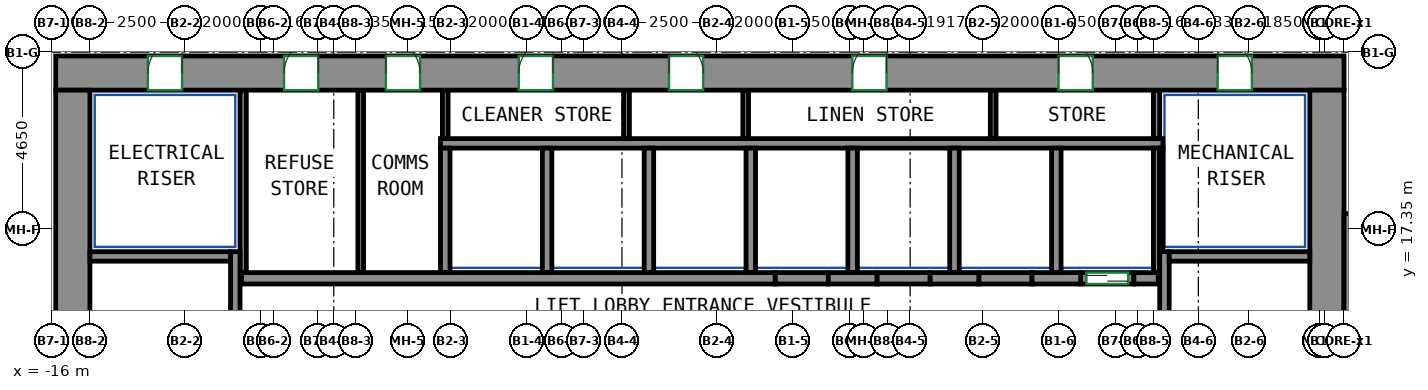
"""IFC4 building model, lengths in metres.
Left out: names, types, materials, properties, quantities, classifications, styles, units other than length and angle.
Written with IfcOpenShell. Run it as: python <this file> out.ifc"""

import sys

from ifc_helpers import new_model, si_unit, direction, frame, frame_2d, origin, place, context, subcontext, project, spatial, rectangle, extrude, source, transform, mapped, element, fill, save


model = new_model("IFC4")
c1 = context("Model", 3, precision=1e-05, world=origin(), true_north=direction((0.0, 1.0)))
c2 = subcontext(c1, "Body", "Model", "MODEL_VIEW")
j1 = project(units=[si_unit("LENGTHUNIT", "METRE"), si_unit("PLANEANGLEUNIT", "RADIAN")], contexts=[c1])
p1 = place(None, origin())
s1 = spatial("IfcSite", under=j1, at=p1, CompositionType="ELEMENT")
p2 = place(p1, origin())
s2 = spatial("IfcBuilding", under=s1, at=p2, CompositionType="ELEMENT")
p3 = place(p2, frame((0.0, 0.0, 143.9)))
s3 = spatial("IfcBuildingStorey", under=s2, at=p3, CompositionType="ELEMENT", Elevation=143.9)
m1 = source(origin(), c2, "Body", "SweptSolid", [
    extrude(rectangle(XDim=33.9, YDim=0.9, at=frame_2d((16.95, 0.0))), origin(), (0.0, 0.0, 1.0), 3.12),
])
p4 = place(p3, frame((-15.9, 21.45, 0.0), z_axis=(0.0, 0.0, 1.0), x_axis=(1.0, 0.0, 0.0)))
e1 = element("IfcWall", 1, at=p4, inside=s3, PredefinedType="SHEAR", context=c2, shape_type="MappedRepresentation", body=[
    mapped(m1, transform((0.0, 0.0, 0.0))),
])
p5 = place(p4, frame((6.008, 0.0, 0.0)))
e2 = element("IfcOpeningElement", 2, at=p5, cuts=e1, PredefinedType="OPENING", context=c2, shape_type="SweptSolid", body=[
    extrude(rectangle(XDim=0.9, YDim=2.1, at=frame_2d((0.45, 1.05))), frame((0.0, 0.46, 0.0), z_axis=(0.0, -1.0, 0.0), x_axis=(1.0, 0.0, 0.0)), (0.0, 0.0, 1.0), 0.92),
])
p6 = place(p4, frame((8.688, 0.0, 0.0)))
e3 = element("IfcOpeningElement", 3, at=p6, cuts=e1, PredefinedType="OPENING", context=c2, shape_type="SweptSolid", body=[
    extrude(rectangle(XDim=0.9, YDim=2.1, at=frame_2d((0.45, 1.05))), frame((0.0, 0.46, 0.0), z_axis=(0.0, -1.0, 0.0), x_axis=(1.0, 0.0, 0.0)), (0.0, 0.0, 1.0), 0.92),
])
p7 = place(p4, frame((12.185, 0.0, 0.0)))
e4 = element("IfcOpeningElement", 4, at=p7, cuts=e1, PredefinedType="OPENING", context=c2, shape_type="SweptSolid", body=[
    extrude(rectangle(XDim=0.9, YDim=2.1, at=frame_2d((0.45, 1.05))), frame((0.0, 0.46, 0.0), z_axis=(0.0, -1.0, 0.0), x_axis=(1.0, 0.0, 0.0)), (0.0, 0.0, 1.0), 0.92),
])
p8 = place(p4, frame((16.138, 0.0, 0.0)))
e5 = element("IfcOpeningElement", 5, at=p8, cuts=e1, PredefinedType="OPENING", context=c2, shape_type="SweptSolid", body=[
    extrude(rectangle(XDim=0.9, YDim=2.1, at=frame_2d((0.45, 1.05))), frame((0.0, 0.46, 0.0), z_axis=(0.0, -1.0, 0.0), x_axis=(1.0, 0.0, 0.0)), (0.0, 0.0, 1.0), 0.92),
])
p9 = place(p4, frame((20.962, 0.0, 0.0)))
e6 = element("IfcOpeningElement", 6, at=p9, cuts=e1, PredefinedType="OPENING", context=c2, shape_type="SweptSolid", body=[
    extrude(rectangle(XDim=0.9, YDim=2.1, at=frame_2d((0.45, 1.05))), frame((0.0, 0.46, 0.0), z_axis=(0.0, -1.0, 0.0), x_axis=(1.0, 0.0, 0.0)), (0.0, 0.0, 1.0), 0.92),
])
p10 = place(p4, frame((26.389, 0.0, 0.0)))
e7 = element("IfcOpeningElement", 7, at=p10, cuts=e1, PredefinedType="OPENING", context=c2, shape_type="SweptSolid", body=[
    extrude(rectangle(XDim=0.9, YDim=2.1, at=frame_2d((0.45, 1.05))), frame((0.0, 0.46, 0.0), z_axis=(0.0, -1.0, 0.0), x_axis=(1.0, 0.0, 0.0)), (0.0, 0.0, 1.0), 0.92),
])
p11 = place(p4, frame((2.425, 0.0, 0.0)))
e8 = element("IfcOpeningElement", 8, at=p11, cuts=e1, PredefinedType="OPENING", context=c2, shape_type="SweptSolid", body=[
    extrude(rectangle(XDim=0.9, YDim=2.1, at=frame_2d((0.45, 1.05))), frame((0.0, 0.46, 0.0), z_axis=(0.0, -1.0, 0.0), x_axis=(1.0, 0.0, 0.0)), (0.0, 0.0, 1.0), 0.92),
])
p12 = place(p4, frame((30.575, 0.0, 0.0)))
e9 = element("IfcOpeningElement", 9, at=p12, cuts=e1, PredefinedType="OPENING", context=c2, shape_type="SweptSolid", body=[
    extrude(rectangle(XDim=0.9, YDim=2.1, at=frame_2d((0.45, 1.05))), frame((0.0, 0.46, 0.0), z_axis=(0.0, -1.0, 0.0), x_axis=(1.0, 0.0, 0.0)), (0.0, 0.0, 1.0), 0.92),
])
m2 = source(origin(), c2, "Body", "SweptSolid", [
    extrude(rectangle(XDim=12.0, YDim=0.9, at=frame_2d((6.0, 0.0))), origin(), (0.0, 0.0, 1.0), 3.12),
])
for number, where, z_axis, x_axis in (
    (10, (-15.45, 9.0, 0.0), (0.0, 0.0, 1.0), (0.0, 1.0, 0.0)),
    (11, (17.55, 9.0, 0.0), (0.0, 0.0, 1.0), (0.0, 1.0, 0.0)),
):
    element("IfcWall", number, at=place(p3, frame(where, z_axis=z_axis, x_axis=x_axis)), inside=s3, PredefinedType="SHEAR", context=c2, shape_type="MappedRepresentation", body=[
        mapped(m2, transform((0.0, 0.0, 0.0))),
    ])
m3 = source(origin(), c2, "Body", "SweptSolid", [
    extrude(rectangle(XDim=7.75, YDim=0.25, at=frame_2d((3.875, 0.0))), origin(), (0.0, 0.0, 1.0), 3.12),
])
p13 = place(p3, frame((-11.175, 9.0, 0.0), z_axis=(0.0, 0.0, 1.0), x_axis=(0.0, 1.0, 0.0)))
e12 = element("IfcWall", 12, at=p13, inside=s3, PredefinedType="SHEAR", context=c2, shape_type="MappedRepresentation", body=[
    mapped(m3, transform((0.0, 0.0, 0.0))),
])
m4 = source(origin(), c2, "Body", "SweptSolid", [
    extrude(rectangle(XDim=3.7, YDim=0.25, at=frame_2d((1.85, 0.0))), origin(), (0.0, 0.0, 1.0), 3.12),
])
p14 = place(p3, frame((-15.0, 16.625, 0.0), z_axis=(0.0, 0.0, 1.0), x_axis=(1.0, 0.0, 0.0)))
e13 = element("IfcWall", 13, at=p14, inside=s3, PredefinedType="SHEAR", context=c2, shape_type="MappedRepresentation", body=[
    mapped(m4, transform((0.0, 0.0, 0.0))),
])
p15 = place(p3, frame((13.275, 9.0, 0.0), z_axis=(0.0, 0.0, 1.0), x_axis=(0.0, 1.0, 0.0)))
e14 = element("IfcWall", 14, at=p15, inside=s3, PredefinedType="SHEAR", context=c2, shape_type="MappedRepresentation", body=[
    mapped(m3, transform((0.0, 0.0, 0.0))),
])
m5 = source(origin(), c2, "Body", "SweptSolid", [
    extrude(rectangle(XDim=3.7, YDim=0.25, at=frame_2d((1.85, 0.0))), origin(), (0.0, 0.0, 1.0), 3.12),
])
p16 = place(p3, frame((13.4, 16.625, 0.0), z_axis=(0.0, 0.0, 1.0), x_axis=(1.0, 0.0, 0.0)))
e15 = element("IfcWall", 15, at=p16, inside=s3, PredefinedType="SHEAR", context=c2, shape_type="MappedRepresentation", body=[
    mapped(m5, transform((0.0, 0.0, 0.0))),
])
m6 = source(origin(), c2, "Body", "SweptSolid", [
    extrude(rectangle(XDim=8.0, YDim=0.35, at=frame_2d((4.0, 0.0))), origin(), (0.0, 0.0, 1.0), 3.12),
])
p17 = place(p3, frame((18.175, 9.75, 0.0), z_axis=(0.0, 0.0, 1.0), x_axis=(0.0, 1.0, 0.0)))
e16 = element("IfcWall", 16, at=p17, inside=s3, PredefinedType="SHEAR", context=c2, shape_type="MappedRepresentation", body=[
    mapped(m6, transform((0.0, 0.0, 0.0))),
])
m7 = source(origin(), c2, "Body", "SweptSolid", [
    extrude(rectangle(XDim=14.04, YDim=0.3, at=frame_2d((7.02, 0.0))), origin(), (0.0, 0.0, 1.0), 3.12),
])
p18 = place(p3, frame((-11.01, 16.05, 0.0), z_axis=(0.0, 0.0, 1.0), x_axis=(1.0, 0.0, 0.0)))
e17 = element("IfcWall", 17, at=p18, inside=s3, PredefinedType="SHEAR", context=c2, shape_type="MappedRepresentation", body=[
    mapped(m7, transform((0.0, 0.0, 0.0))),
])
m8 = source(origin(), c2, "Body", "SweptSolid", [
    extrude(rectangle(XDim=1.28, YDim=0.3, at=frame_2d((0.64, 0.0))), origin(), (0.0, 0.0, 1.0), 3.12),
])
p19 = place(p3, frame((4.43, 16.05, 0.0), z_axis=(0.0, 0.0, 1.0), x_axis=(1.0, 0.0, 0.0)))
e18 = element("IfcWall", 18, at=p19, inside=s3, PredefinedType="SHEAR", context=c2, shape_type="MappedRepresentation", body=[
    mapped(m8, transform((0.0, 0.0, 0.0))),
])
m9 = source(origin(), c2, "Body", "SweptSolid", [
    extrude(rectangle(XDim=1.28, YDim=0.3, at=frame_2d((0.64, 0.0))), origin(), (0.0, 0.0, 1.0), 3.12),
])
p20 = place(p3, frame((7.11, 16.05, 0.0), z_axis=(0.0, 0.0, 1.0), x_axis=(1.0, 0.0, 0.0)))
e19 = element("IfcWall", 19, at=p20, inside=s3, PredefinedType="SHEAR", context=c2, shape_type="MappedRepresentation", body=[
    mapped(m9, transform((0.0, 0.0, 0.0))),
])
p21 = place(p3, frame((9.79, 16.05, 0.0), z_axis=(0.0, 0.0, 1.0), x_axis=(1.0, 0.0, 0.0)))
e20 = element("IfcWall", 20, at=p21, inside=s3, PredefinedType="SHEAR", context=c2, shape_type="MappedRepresentation", body=[
    mapped(m8, transform((0.0, 0.0, 0.0))),
])
m10 = source(origin(), c2, "Body", "SweptSolid", [
    extrude(rectangle(XDim=0.64, YDim=0.3, at=frame_2d((0.32, 0.0))), origin(), (0.0, 0.0, 1.0), 3.12),
])
p22 = place(p3, frame((12.47, 16.05, 0.0), z_axis=(0.0, 0.0, 1.0), x_axis=(1.0, 0.0, 0.0)))
e21 = element("IfcWall", 21, at=p22, inside=s3, PredefinedType="SHEAR", context=c2, shape_type="MappedRepresentation", body=[
    mapped(m10, transform((0.0, 0.0, 0.0))),
])
m11 = source(origin(), c2, "Body", "SweptSolid", [
    extrude(rectangle(XDim=1.4, YDim=0.3, at=frame_2d((0.7, 0.0))), origin(), (0.0, 0.0, 1.0), 3.12),
])
p23 = place(p3, frame((11.07, 16.05, 0.0), z_axis=(0.0, 0.0, 1.0), x_axis=(1.0, 0.0, 0.0)))
e22 = element("IfcWall", 22, at=p23, inside=s3, PredefinedType="PARTITIONING", context=c2, shape_type="MappedRepresentation", body=[
    mapped(m11, transform((0.0, 0.0, 0.0))),
])
p24 = place(p23, frame((0.15, 0.0, 0.0)))
e23 = element("IfcOpeningElement", 23, at=p24, cuts=e22, PredefinedType="OPENING", context=c2, shape_type="SweptSolid", body=[
    extrude(rectangle(XDim=1.1, YDim=2.1, at=frame_2d((0.55, 1.05))), frame((0.0, 0.16, 0.0), z_axis=(0.0, -1.0, 0.0), x_axis=(1.0, 0.0, 0.0)), (0.0, 0.0, 1.0), 0.32),
])
p25 = place(p3, frame((3.03, 16.05, 0.0), z_axis=(0.0, 0.0, 1.0), x_axis=(1.0, 0.0, 0.0)))
e24 = element("IfcWall", 24, at=p25, inside=s3, PredefinedType="PARTITIONING", context=c2, shape_type="MappedRepresentation", body=[
    mapped(m11, transform((0.0, 0.0, 0.0))),
])
m12 = source(origin(), c2, "Body", "SweptSolid", [
    extrude(rectangle(XDim=1.4, YDim=0.3, at=frame_2d((0.7, 0.0))), origin(), (0.0, 0.0, 1.0), 3.12),
])
for number, where, z_axis, x_axis in (
    (25, (5.71, 16.05, 0.0), (0.0, 0.0, 1.0), (1.0, 0.0, 0.0)),
    (26, (8.39, 16.05, 0.0), (0.0, 0.0, 1.0), (1.0, 0.0, 0.0)),
):
    element("IfcWall", number, at=place(p3, frame(where, z_axis=z_axis, x_axis=x_axis)), inside=s3, PredefinedType="PARTITIONING", context=c2, shape_type="MappedRepresentation", body=[
        mapped(m12, transform((0.0, 0.0, 0.0))),
    ])
m13 = source(origin(), c2, "Body", "SweptSolid", [
    extrude(rectangle(XDim=19.01, YDim=0.25, at=frame_2d((9.505, 0.0))), origin(), (0.0, 0.0, 1.0), 3.12),
])
p26 = place(p3, frame((-5.775, 19.6, 0.0), z_axis=(0.0, 0.0, 1.0), x_axis=(1.0, 0.0, 0.0)))
e27 = element("IfcWall", 27, at=p26, inside=s3, PredefinedType="PARTITIONING", context=c2, shape_type="MappedRepresentation", body=[
    mapped(m13, transform((0.0, 0.0, 0.0))),
])
m14 = source(origin(), c2, "Body", "SweptSolid", [
    extrude(rectangle(XDim=3.275, YDim=0.165, at=frame_2d((1.638, 0.0))), origin(), (0.0, 0.0, 1.0), 3.12),
])
p27 = place(p3, frame((13.067, 16.2, 0.0), z_axis=(0.0, 0.0, 1.0), x_axis=(0.0, 1.0, 0.0)))
e28 = element("IfcWall", 28, at=p27, inside=s3, PredefinedType="PARTITIONING", context=c2, shape_type="MappedRepresentation", body=[
    mapped(m14, transform((0.0, 0.0, 0.0))),
])
m15 = source(origin(), c2, "Body", "SweptSolid", [
    extrude(rectangle(XDim=1.275, YDim=0.165, at=frame_2d((0.637, 0.0))), origin(), (0.0, 0.0, 1.0), 3.12),
])
p28 = place(p3, frame((13.067, 19.725, 0.0), z_axis=(0.0, 0.0, 1.0), x_axis=(0.0, 1.0, 0.0)))
e29 = element("IfcWall", 29, at=p28, inside=s3, PredefinedType="PARTITIONING", context=c2, shape_type="MappedRepresentation", body=[
    mapped(m15, transform((0.0, 0.0, 0.0))),
])
m16 = source(origin(), c2, "Body", "SweptSolid", [
    extrude(rectangle(XDim=4.8, YDim=0.165, at=frame_2d((2.4, 0.0))), origin(), (0.0, 0.0, 1.0), 3.12),
])
p29 = place(p3, frame((-10.968, 16.2, 0.0), z_axis=(0.0, 0.0, 1.0), x_axis=(0.0, 1.0, 0.0)))
e30 = element("IfcWall", 30, at=p29, inside=s3, PredefinedType="PARTITIONING", context=c2, shape_type="MappedRepresentation", body=[
    mapped(m16, transform((0.0, 0.0, 0.0))),
])
m17 = source(origin(), c2, "Body", "SweptSolid", [
    extrude(rectangle(XDim=3.275, YDim=0.25, at=frame_2d((1.638, 0.0))), origin(), (0.0, 0.0, 1.0), 3.12),
])
p30 = place(p3, frame((10.43, 16.2, 0.0), z_axis=(0.0, 0.0, 1.0), x_axis=(0.0, 1.0, 0.0)))
e31 = element("IfcWall", 31, at=p30, inside=s3, PredefinedType="PARTITIONING", context=c2, shape_type="MappedRepresentation", body=[
    mapped(m17, transform((0.0, 0.0, 0.0))),
])
m18 = source(origin(), c2, "Body", "SweptSolid", [
    extrude(rectangle(XDim=2.725, YDim=0.085, at=frame_2d((1.363, 0.0))), origin(), (0.0, 0.0, 1.0), 3.12),
])
p31 = place(p3, frame((13.192, 16.75, 0.0), z_axis=(0.0, 0.0, 1.0), x_axis=(0.0, 1.0, 0.0)))
e32 = element("IfcWall", 32, at=p31, inside=s3, PredefinedType="PARTITIONING", context=c2, shape_type="MappedRepresentation", body=[
    mapped(m18, transform((0.0, 0.0, 0.0))),
])
for number, where, z_axis, x_axis in (
    (33, (2.39, 16.2, 0.0), (0.0, 0.0, 1.0), (0.0, 1.0, 0.0)),
    (34, (5.07, 16.2, 0.0), (0.0, 0.0, 1.0), (0.0, 1.0, 0.0)),
    (35, (7.75, 16.2, 0.0), (0.0, 0.0, 1.0), (0.0, 1.0, 0.0)),
    (36, (-0.29, 16.2, 0.0), (0.0, 0.0, 1.0), (0.0, 1.0, 0.0)),
    (37, (-2.97, 16.2, 0.0), (0.0, 0.0, 1.0), (0.0, 1.0, 0.0)),
    (38, (-5.65, 16.2, 0.0), (0.0, 0.0, 1.0), (0.0, 1.0, 0.0)),
):
    element("IfcWall", number, at=place(p3, frame(where, z_axis=z_axis, x_axis=x_axis)), inside=s3, PredefinedType="PARTITIONING", context=c2, shape_type="MappedRepresentation", body=[
        mapped(m17, transform((0.0, 0.0, 0.0))),
    ])
m19 = source(origin(), c2, "Body", "SweptSolid", [
    extrude(rectangle(XDim=4.8, YDim=0.15, at=frame_2d((2.4, 0.0))), origin(), (0.0, 0.0, 1.0), 3.12),
])
p32 = place(p3, frame((-7.875, 16.2, 0.0), z_axis=(0.0, 0.0, 1.0), x_axis=(0.0, 1.0, 0.0)))
e39 = element("IfcWall", 39, at=p32, inside=s3, PredefinedType="PARTITIONING", context=c2, shape_type="MappedRepresentation", body=[
    mapped(m19, transform((0.0, 0.0, 0.0))),
])
m20 = source(origin(), c2, "Body", "SweptSolid", [
    extrude(rectangle(XDim=1.275, YDim=0.15, at=frame_2d((0.637, 0.0))), origin(), (0.0, 0.0, 1.0), 3.12),
])
for number, where, z_axis, x_axis in (
    (40, (-5.65, 19.725, 0.0), (0.0, 0.0, 1.0), (0.0, 1.0, 0.0)),
    (41, (-0.88, 19.725, 0.0), (0.0, 0.0, 1.0), (0.0, 1.0, 0.0)),
    (42, (2.256, 19.725, 0.0), (0.0, 0.0, 1.0), (0.0, 1.0, 0.0)),
    (43, (8.768, 19.725, 0.0), (0.0, 0.0, 1.0), (0.0, 1.0, 0.0)),
):
    element("IfcWall", number, at=place(p3, frame(where, z_axis=z_axis, x_axis=x_axis)), inside=s3, PredefinedType="PARTITIONING", context=c2, shape_type="MappedRepresentation", body=[
        mapped(m20, transform((0.0, 0.0, 0.0))),
    ])
p33 = place(p24, origin())
e44 = element("IfcDoor", 44, at=p33, inside=s3, OperationType="DOUBLE_DOOR_SLIDING", PredefinedType="DOOR", context=c2, shape_type="SweptSolid", body=[
    extrude(rectangle(XDim=1.1, YDim=2.1, at=frame_2d((0.55, 1.05))), frame((0.0, 0.025, 0.0), z_axis=(0.0, -1.0, 0.0), x_axis=(1.0, 0.0, 0.0)), (0.0, 0.0, 1.0), 0.05),
])
fill(e23, e44)
p34 = place(p5, origin())
e45 = element("IfcDoor", 45, at=p34, inside=s3, OperationType="SINGLE_SWING_RIGHT", PredefinedType="DOOR", context=c2, shape_type="SweptSolid", body=[
    extrude(rectangle(XDim=0.9, YDim=2.1, at=frame_2d((0.45, 1.05))), frame((0.0, -0.305, 0.0), z_axis=(0.0, -1.0, 0.0), x_axis=(1.0, 0.0, 0.0)), (0.0, 0.0, 1.0), 0.05),
])
fill(e2, e45)
p35 = place(p6, origin())
e46 = element("IfcDoor", 46, at=p35, inside=s3, OperationType="SINGLE_SWING_LEFT", PredefinedType="DOOR", context=c2, shape_type="SweptSolid", body=[
    extrude(rectangle(XDim=0.9, YDim=2.1, at=frame_2d((0.45, 1.05))), frame((0.0, -0.305, 0.0), z_axis=(0.0, -1.0, 0.0), x_axis=(1.0, 0.0, 0.0)), (0.0, 0.0, 1.0), 0.05),
])
fill(e3, e46)
p36 = place(p7, origin())
e47 = element("IfcDoor", 47, at=p36, inside=s3, OperationType="SINGLE_SWING_RIGHT", PredefinedType="DOOR", context=c2, shape_type="SweptSolid", body=[
    extrude(rectangle(XDim=0.9, YDim=2.1, at=frame_2d((0.45, 1.05))), frame((0.0, -0.305, 0.0), z_axis=(0.0, -1.0, 0.0), x_axis=(1.0, 0.0, 0.0)), (0.0, 0.0, 1.0), 0.05),
])
fill(e4, e47)
p37 = place(p8, origin())
e48 = element("IfcDoor", 48, at=p37, inside=s3, OperationType="SINGLE_SWING_LEFT", PredefinedType="DOOR", context=c2, shape_type="SweptSolid", body=[
    extrude(rectangle(XDim=0.9, YDim=2.1, at=frame_2d((0.45, 1.05))), frame((0.0, -0.305, 0.0), z_axis=(0.0, -1.0, 0.0), x_axis=(1.0, 0.0, 0.0)), (0.0, 0.0, 1.0), 0.05),
])
fill(e5, e48)
p38 = place(p9, origin())
e49 = element("IfcDoor", 49, at=p38, inside=s3, OperationType="SINGLE_SWING_RIGHT", PredefinedType="DOOR", context=c2, shape_type="SweptSolid", body=[
    extrude(rectangle(XDim=0.9, YDim=2.1, at=frame_2d((0.45, 1.05))), frame((0.0, -0.305, 0.0), z_axis=(0.0, -1.0, 0.0), x_axis=(1.0, 0.0, 0.0)), (0.0, 0.0, 1.0), 0.05),
])
fill(e6, e49)
p39 = place(p10, origin())
e50 = element("IfcDoor", 50, at=p39, inside=s3, OperationType="SINGLE_SWING_LEFT", PredefinedType="DOOR", context=c2, shape_type="SweptSolid", body=[
    extrude(rectangle(XDim=0.9, YDim=2.1, at=frame_2d((0.45, 1.05))), frame((0.0, -0.305, 0.0), z_axis=(0.0, -1.0, 0.0), x_axis=(1.0, 0.0, 0.0)), (0.0, 0.0, 1.0), 0.05),
])
fill(e7, e50)
p40 = place(p11, origin())
e51 = element("IfcDoor", 51, at=p40, inside=s3, OperationType="SINGLE_SWING_RIGHT", PredefinedType="DOOR", context=c2, shape_type="SweptSolid", body=[
    extrude(rectangle(XDim=0.9, YDim=2.1, at=frame_2d((0.45, 1.05))), frame((0.0, -0.305, 0.0), z_axis=(0.0, -1.0, 0.0), x_axis=(1.0, 0.0, 0.0)), (0.0, 0.0, 1.0), 0.05),
])
fill(e8, e51)
p41 = place(p12, origin())
e52 = element("IfcDoor", 52, at=p41, inside=s3, OperationType="SINGLE_SWING_LEFT", PredefinedType="DOOR", context=c2, shape_type="SweptSolid", body=[
    extrude(rectangle(XDim=0.9, YDim=2.1, at=frame_2d((0.45, 1.05))), frame((0.0, -0.305, 0.0), z_axis=(0.0, -1.0, 0.0), x_axis=(1.0, 0.0, 0.0)), (0.0, 0.0, 1.0), 0.05),
])
fill(e9, e52)
save(model, sys.argv[1])
